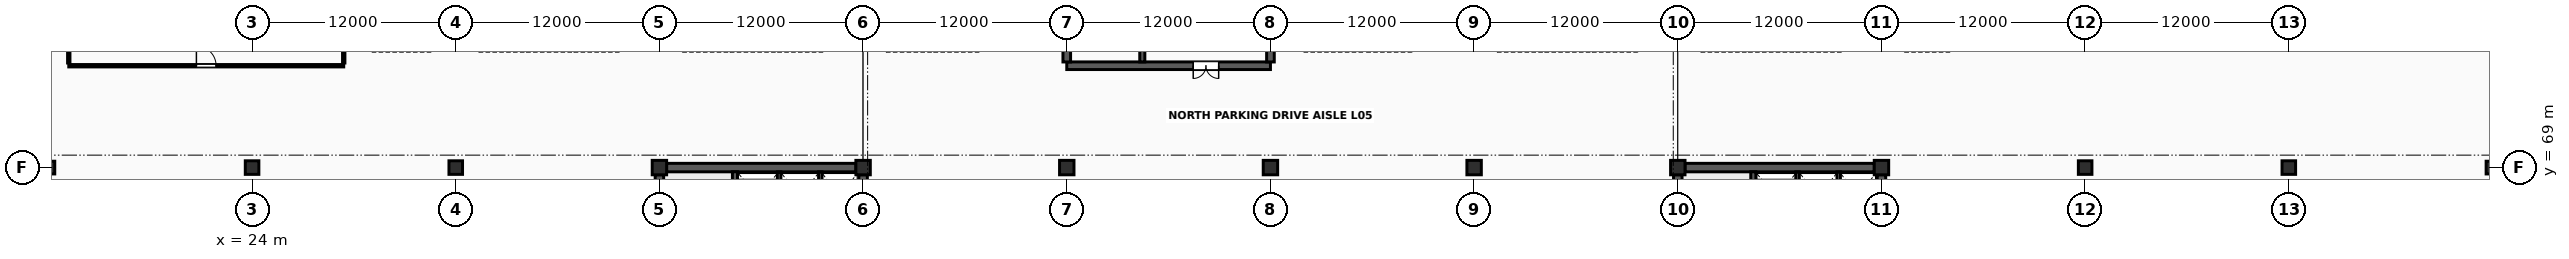
"""IFC4 building model, lengths in metres.
Left out: names, types, materials, properties, quantities, classifications, styles, units other than length and angle.
Written with IfcOpenShell. Run it as: python <this file> out.ifc"""

import sys

from ifc_helpers import new_model, si_unit, direction, frame, frame_2d, origin, origin_2d, place, context, subcontext, project, spatial, rectangle, extrude, element, fill, save


model = new_model("IFC4")
c1 = context("Model", 3, precision=1e-05, world=origin(), true_north=direction((0.0, 1.0)))
c2 = subcontext(c1, "Body", "Model", "MODEL_VIEW")
j1 = project(units=[si_unit("LENGTHUNIT", "METRE"), si_unit("PLANEANGLEUNIT", "RADIAN")], contexts=[c1])
p1 = place(None, origin())
s1 = spatial("IfcSite", under=j1, at=p1, CompositionType="ELEMENT")
p2 = place(p1, origin())
s2 = spatial("IfcBuilding", under=s1, at=p2, CompositionType="ELEMENT")
p3 = place(p2, frame((0.0, 0.0, 21.0)))
s3 = spatial("IfcBuildingStorey", under=s2, at=p3, CompositionType="ELEMENT", Elevation=21.0)
p4 = place(p3, frame((12.0, 69.0, 0.0), z_axis=(0.0, 0.0, 1.0), x_axis=(1.0, 0.0, 0.0)))
e1 = element("IfcColumn", 1, at=p4, inside=s3, PredefinedType="COLUMN", context=c2, shape_type="SweptSolid", body=[
    extrude(rectangle(XDim=0.75, YDim=0.75, at=origin_2d()), origin(), (0.0, 0.0, 1.0), 3.8),
])
for number, where, z_axis, x_axis in (
    (2, (24.0, 69.0, 0.0), (0.0, 0.0, 1.0), (1.0, 0.0, 0.0)),
    (3, (36.0, 69.0, 0.0), (0.0, 0.0, 1.0), (1.0, 0.0, 0.0)),
):
    element("IfcColumn", number, at=place(p3, frame(where, z_axis=z_axis, x_axis=x_axis)), inside=s3, PredefinedType="COLUMN", context=c2, shape_type="SweptSolid", body=[
        extrude(rectangle(XDim=0.8, YDim=0.8, at=origin_2d()), origin(), (0.0, 0.0, 1.0), 3.8),
    ])
for number, where, z_axis, x_axis in (
    (4, (48.0, 69.0, 0.0), (0.0, 0.0, 1.0), (1.0, 0.0, 0.0)),
    (5, (60.0, 69.0, 0.0), (0.0, 0.0, 1.0), (1.0, 0.0, 0.0)),
    (6, (72.0, 69.0, 0.0), (0.0, 0.0, 1.0), (1.0, 0.0, 0.0)),
    (7, (84.0, 69.0, 0.0), (0.0, 0.0, 1.0), (1.0, 0.0, 0.0)),
    (8, (96.0, 69.0, 0.0), (0.0, 0.0, 1.0), (1.0, 0.0, 0.0)),
    (9, (108.0, 69.0, 0.0), (0.0, 0.0, 1.0), (1.0, 0.0, 0.0)),
    (10, (120.0, 69.0, 0.0), (0.0, 0.0, 1.0), (1.0, 0.0, 0.0)),
):
    element("IfcColumn", number, at=place(p3, frame(where, z_axis=z_axis, x_axis=x_axis)), inside=s3, PredefinedType="COLUMN", context=c2, shape_type="SweptSolid", body=[
        extrude(rectangle(XDim=0.85, YDim=0.85, at=origin_2d()), origin(), (0.0, 0.0, 1.0), 3.8),
    ])
for number, where, z_axis, x_axis in (
    (11, (132.0, 69.0, 0.0), (0.0, 0.0, 1.0), (1.0, 0.0, 0.0)),
    (12, (144.0, 69.0, 0.0), (0.0, 0.0, 1.0), (1.0, 0.0, 0.0)),
):
    element("IfcColumn", number, at=place(p3, frame(where, z_axis=z_axis, x_axis=x_axis)), inside=s3, PredefinedType="COLUMN", context=c2, shape_type="SweptSolid", body=[
        extrude(rectangle(XDim=0.8, YDim=0.8, at=origin_2d()), origin(), (0.0, 0.0, 1.0), 3.8),
    ])
p5 = place(p3, frame((156.0, 69.0, 0.0), z_axis=(0.0, 0.0, 1.0), x_axis=(1.0, 0.0, 0.0)))
e13 = element("IfcColumn", 13, at=p5, inside=s3, PredefinedType="COLUMN", context=c2, shape_type="SweptSolid", body=[
    extrude(rectangle(XDim=0.75, YDim=0.75, at=origin_2d()), origin(), (0.0, 0.0, 1.0), 3.8),
])
for number, where, z_axis, x_axis in (
    (14, (48.422, 69.0, 0.0), (0.0, 0.0, 1.0), (1.0, 0.0, 0.0)),
    (15, (48.0, 57.422, 0.0), (0.0, 0.0, 1.0), (0.0, 1.0, 0.0)),
    (16, (60.0, 57.422, 0.0), (0.0, 0.0, 1.0), (0.0, 1.0, 0.0)),
):
    element("IfcWall", number, at=place(p3, frame(where, z_axis=z_axis, x_axis=x_axis)), inside=s3, PredefinedType="SHEAR", context=c2, shape_type="SweptSolid", body=[
        extrude(rectangle(XDim=11.156, YDim=0.5, at=frame_2d((5.578, 0.0))), origin(), (0.0, 0.0, 1.0), 3.638),
    ])
p6 = place(p3, frame((52.45, 57.247, 0.0), z_axis=(0.0, 0.0, 1.0), x_axis=(0.0, 1.0, 0.0)))
e17 = element("IfcWall", 17, at=p6, inside=s3, PredefinedType="SHEAR", context=c2, shape_type="SweptSolid", body=[
    extrude(rectangle(XDim=11.506, YDim=0.3, at=frame_2d((5.753, 0.0))), origin(), (0.0, 0.0, 1.0), 3.638),
])
p7 = place(p6, frame((0.9, 0.0, 0.0)))
e18 = element("IfcOpeningElement", 18, at=p7, cuts=e17, PredefinedType="OPENING", context=c2, shape_type="SweptSolid", body=[
    extrude(rectangle(XDim=1.1, YDim=2.2, at=frame_2d((0.55, 1.1))), frame((0.0, 0.165, 0.0), z_axis=(0.0, -1.0, 0.0), x_axis=(1.0, 0.0, 0.0)), (0.0, 0.0, 1.0), 0.33),
])
for number, where, z_axis, x_axis in (
    (19, (55.05, 65.92, 0.0), (0.0, 0.0, 1.0), (0.0, 1.0, 0.0)),
    (20, (57.48, 65.92, 0.0), (0.0, 0.0, 1.0), (0.0, 1.0, 0.0)),
):
    element("IfcWall", number, at=place(p3, frame(where, z_axis=z_axis, x_axis=x_axis)), inside=s3, PredefinedType="SOLIDWALL", context=c2, shape_type="SweptSolid", body=[
        extrude(rectangle(XDim=2.83, YDim=0.2, at=frame_2d((1.415, 0.0))), origin(), (0.0, 0.0, 1.0), 3.628),
    ])
for number, where, z_axis, x_axis in (
    (21, (108.422, 69.0, 0.0), (0.0, 0.0, 1.0), (1.0, 0.0, 0.0)),
    (22, (108.0, 57.422, 0.0), (0.0, 0.0, 1.0), (0.0, 1.0, 0.0)),
    (23, (120.0, 57.422, 0.0), (0.0, 0.0, 1.0), (0.0, 1.0, 0.0)),
):
    element("IfcWall", number, at=place(p3, frame(where, z_axis=z_axis, x_axis=x_axis)), inside=s3, PredefinedType="SHEAR", context=c2, shape_type="SweptSolid", body=[
        extrude(rectangle(XDim=11.156, YDim=0.5, at=frame_2d((5.578, 0.0))), origin(), (0.0, 0.0, 1.0), 3.638),
    ])
p8 = place(p3, frame((112.45, 57.247, 0.0), z_axis=(0.0, 0.0, 1.0), x_axis=(0.0, 1.0, 0.0)))
e24 = element("IfcWall", 24, at=p8, inside=s3, PredefinedType="SHEAR", context=c2, shape_type="SweptSolid", body=[
    extrude(rectangle(XDim=11.506, YDim=0.3, at=frame_2d((5.753, 0.0))), origin(), (0.0, 0.0, 1.0), 3.638),
])
p9 = place(p8, frame((0.9, 0.0, 0.0)))
e25 = element("IfcOpeningElement", 25, at=p9, cuts=e24, PredefinedType="OPENING", context=c2, shape_type="SweptSolid", body=[
    extrude(rectangle(XDim=1.1, YDim=2.2, at=frame_2d((0.55, 1.1))), frame((0.0, 0.165, 0.0), z_axis=(0.0, -1.0, 0.0), x_axis=(1.0, 0.0, 0.0)), (0.0, 0.0, 1.0), 0.33),
])
for number, where, z_axis, x_axis in (
    (26, (115.05, 65.92, 0.0), (0.0, 0.0, 1.0), (0.0, 1.0, 0.0)),
    (27, (117.48, 65.92, 0.0), (0.0, 0.0, 1.0), (0.0, 1.0, 0.0)),
):
    element("IfcWall", number, at=place(p3, frame(where, z_axis=z_axis, x_axis=x_axis)), inside=s3, PredefinedType="SOLIDWALL", context=c2, shape_type="SweptSolid", body=[
        extrude(rectangle(XDim=2.83, YDim=0.2, at=frame_2d((1.415, 0.0))), origin(), (0.0, 0.0, 1.0), 3.628),
    ])
p10 = place(p3, frame((72.0, 75.0, 0.0), z_axis=(0.0, 0.0, 1.0), x_axis=(1.0, 0.0, 0.0)))
e28 = element("IfcWall", 28, at=p10, inside=s3, PredefinedType="SHEAR", context=c2, shape_type="SweptSolid", body=[
    extrude(rectangle(XDim=12.0, YDim=0.45, at=frame_2d((6.0, 0.0))), origin(), (0.0, 0.0, 1.0), 3.638),
])
p11 = place(p10, frame((7.45, 0.0, 0.0)))
e29 = element("IfcOpeningElement", 29, at=p11, cuts=e28, PredefinedType="OPENING", context=c2, shape_type="SweptSolid", body=[
    extrude(rectangle(XDim=1.5, YDim=2.25, at=frame_2d((0.75, 1.125))), frame((0.0, 0.24, 0.0), z_axis=(0.0, -1.0, 0.0), x_axis=(1.0, 0.0, 0.0)), (0.0, 0.0, 1.0), 0.48),
])
for number, where, z_axis, x_axis in (
    (30, (72.0, 75.222, 0.0), (0.0, 0.0, 1.0), (0.0, 1.0, 0.0)),
    (31, (84.0, 75.222, 0.0), (0.0, 0.0, 1.0), (0.0, 1.0, 0.0)),
):
    element("IfcWall", number, at=place(p3, frame(where, z_axis=z_axis, x_axis=x_axis)), inside=s3, PredefinedType="SHEAR", context=c2, shape_type="SweptSolid", body=[
        extrude(rectangle(XDim=11.381, YDim=0.45, at=frame_2d((5.69, 0.0))), origin(), (0.0, 0.0, 1.0), 3.638),
    ])
p12 = place(p3, frame((76.45, 75.222, 0.0), z_axis=(0.0, 0.0, 1.0), x_axis=(0.0, 1.0, 0.0)))
e32 = element("IfcWall", 32, at=p12, inside=s3, PredefinedType="SHEAR", context=c2, shape_type="SweptSolid", body=[
    extrude(rectangle(XDim=11.556, YDim=0.3, at=frame_2d((5.778, 0.0))), origin(), (0.0, 0.0, 1.0), 3.638),
])
p13 = place(p12, frame((0.9, 0.0, 0.0)))
e33 = element("IfcOpeningElement", 33, at=p13, cuts=e32, PredefinedType="OPENING", context=c2, shape_type="SweptSolid", body=[
    extrude(rectangle(XDim=1.1, YDim=2.2, at=frame_2d((0.55, 1.1))), frame((0.0, 0.165, 0.0), z_axis=(0.0, -1.0, 0.0), x_axis=(1.0, 0.0, 0.0)), (0.0, 0.0, 1.0), 0.33),
])
p14 = place(p3, frame((13.2, 75.0, 0.0), z_axis=(0.0, 0.0, 1.0), x_axis=(1.0, 0.0, 0.0)))
e34 = element("IfcWall", 34, at=p14, inside=s3, PredefinedType="PARTITIONING", context=c2, shape_type="SweptSolid", body=[
    extrude(rectangle(XDim=16.2, YDim=0.14, at=frame_2d((8.1, 0.0))), origin(), (0.0, 0.0, 1.0), 2.75),
])
p15 = place(p14, frame((7.52, 0.0, 0.0)))
e35 = element("IfcOpeningElement", 35, at=p15, cuts=e34, PredefinedType="OPENING", context=c2, shape_type="SweptSolid", body=[
    extrude(rectangle(XDim=1.16, YDim=2.23, at=frame_2d((0.58, 1.115))), frame((0.0, 0.085, 0.0), z_axis=(0.0, -1.0, 0.0), x_axis=(1.0, 0.0, 0.0)), (0.0, 0.0, 1.0), 0.17),
])
for number, where, z_axis, x_axis in (
    (36, (13.2, 75.16, 0.0), (0.0, 0.0, 1.0), (0.0, 1.0, 0.0)),
    (37, (29.4, 75.16, 0.0), (0.0, 0.0, 1.0), (0.0, 1.0, 0.0)),
):
    element("IfcWall", number, at=place(p3, frame(where, z_axis=z_axis, x_axis=x_axis)), inside=s3, PredefinedType="PARTITIONING", context=c2, shape_type="SweptSolid", body=[
        extrude(rectangle(XDim=15.68, YDim=0.14, at=frame_2d((7.84, 0.0))), origin(), (0.0, 0.0, 1.0), 2.75),
    ])
p16 = place(p11, origin())
e38 = element("IfcDoor", 38, at=p16, inside=s3, OperationType="DOUBLE_DOOR_SINGLE_SWING", PredefinedType="DOOR", context=c2, shape_type="SweptSolid", body=[
    extrude(rectangle(XDim=1.5, YDim=2.25, at=frame_2d((0.75, 1.125))), frame((0.0, 0.025, 0.0), z_axis=(0.0, -1.0, 0.0), x_axis=(1.0, 0.0, 0.0)), (0.0, 0.0, 1.0), 0.05),
])
fill(e29, e38)
p17 = place(p15, origin())
e39 = element("IfcDoor", 39, at=p17, inside=s3, OperationType="SINGLE_SWING_LEFT", PredefinedType="DOOR", context=c2, shape_type="SweptSolid", body=[
    extrude(rectangle(XDim=1.16, YDim=2.23, at=frame_2d((0.58, 1.115))), frame((0.0, 0.025, 0.0), z_axis=(0.0, -1.0, 0.0), x_axis=(1.0, 0.0, 0.0)), (0.0, 0.0, 1.0), 0.05),
])
fill(e35, e39)
save(model, sys.argv[1])
